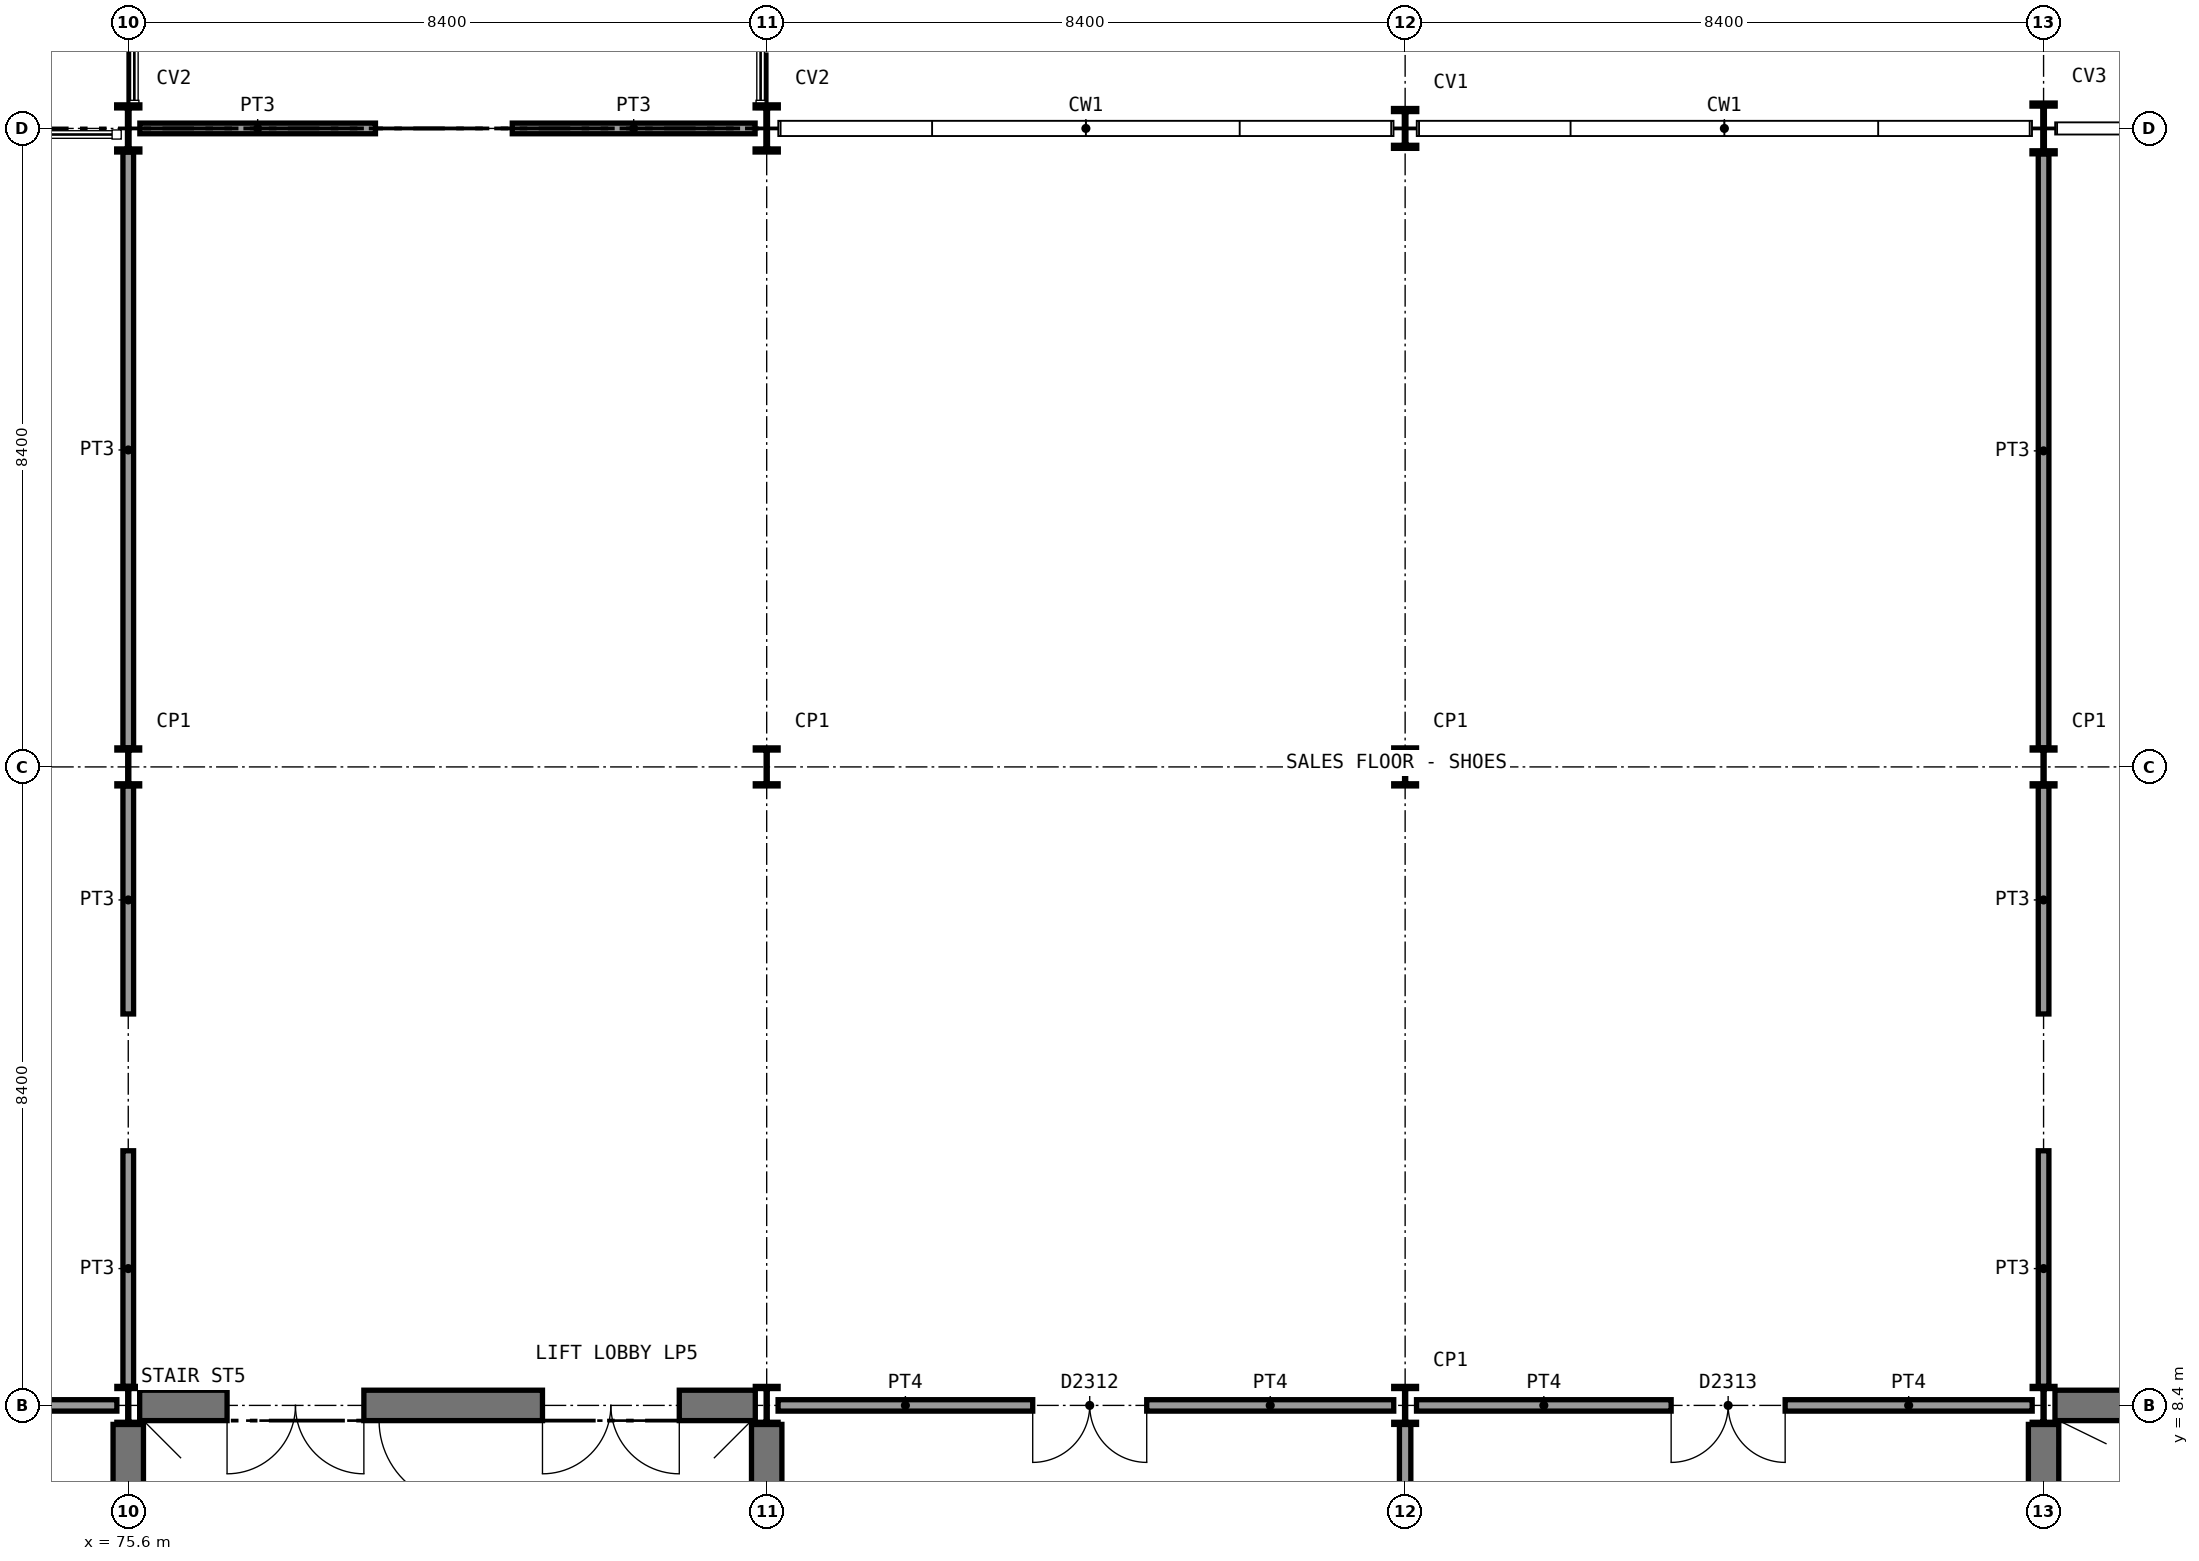
"""IFC4 building model, lengths in metres.
Left out: names, types, materials, properties, quantities, classifications, styles, units other than length and angle.
Written with IfcOpenShell. Run it as: python <this file> out.ifc"""

import sys

from ifc_helpers import new_model, si_unit, direction, frame, frame_2d, origin, origin_2d, place, context, subcontext, project, spatial, rectangle, i_section, extrude, element, fill, save


model = new_model("IFC4")
c1 = context("Model", 3, precision=1e-05, world=origin(), true_north=direction((0.0, 1.0)))
c2 = subcontext(c1, "Body", "Model", "MODEL_VIEW")
j1 = project(units=[si_unit("LENGTHUNIT", "METRE"), si_unit("PLANEANGLEUNIT", "RADIAN")], contexts=[c1])
p1 = place(None, origin())
s1 = spatial("IfcSite", under=j1, at=p1, CompositionType="ELEMENT")
p2 = place(p1, origin())
s2 = spatial("IfcBuilding", under=s1, at=p2, CompositionType="ELEMENT")
p3 = place(p2, frame((0.0, 0.0, 6.0)))
s3 = spatial("IfcBuildingStorey", under=s2, at=p3, CompositionType="ELEMENT", Elevation=6.0)
p4 = place(p3, frame((75.75, 8.4, 0.0), z_axis=(0.0, 0.0, 1.0), x_axis=(1.0, 0.0, 0.0)))
e1 = element("IfcWall", 1, at=p4, inside=s3, PredefinedType="SHEAR", context=c2, shape_type="SweptSolid", body=[
    extrude(rectangle(XDim=8.1, YDim=0.4, at=frame_2d((4.05, 0.0))), origin(), (0.0, 0.0, 1.0), 5.25),
])
p5 = place(p4, frame((1.15, 0.0, 0.0)))
e2 = element("IfcOpeningElement", 2, at=p5, cuts=e1, PredefinedType="OPENING", context=c2, shape_type="SweptSolid", body=[
    extrude(rectangle(XDim=1.8, YDim=2.1, at=frame_2d((0.9, 1.05))), frame((0.0, 0.21, 0.0), z_axis=(0.0, -1.0, 0.0), x_axis=(1.0, 0.0, 0.0)), (0.0, 0.0, 1.0), 0.42),
])
p6 = place(p4, frame((5.3, 0.0, 0.0)))
e3 = element("IfcOpeningElement", 3, at=p6, cuts=e1, PredefinedType="OPENING", context=c2, shape_type="SweptSolid", body=[
    extrude(rectangle(XDim=1.8, YDim=2.1, at=frame_2d((0.9, 1.05))), frame((0.0, 0.21, 0.0), z_axis=(0.0, -1.0, 0.0), x_axis=(1.0, 0.0, 0.0)), (0.0, 0.0, 1.0), 0.42),
])
for number, where, z_axis, x_axis in (
    (4, (75.6, 0.25, 0.0), (0.0, 0.0, 1.0), (0.0, 1.0, 0.0)),
    (5, (84.0, 0.25, 0.0), (0.0, 0.0, 1.0), (0.0, 1.0, 0.0)),
):
    element("IfcWall", number, at=place(p3, frame(where, z_axis=z_axis, x_axis=x_axis)), inside=s3, PredefinedType="SHEAR", context=c2, shape_type="SweptSolid", body=[
        extrude(rectangle(XDim=7.9, YDim=0.4, at=frame_2d((3.95, 0.0))), origin(), (0.0, 0.0, 1.0), 5.25),
    ])
p7 = place(p3, frame((100.95, 8.4, 0.0), z_axis=(0.0, 0.0, 1.0), x_axis=(1.0, 0.0, 0.0)))
e6 = element("IfcWall", 6, at=p7, inside=s3, PredefinedType="SHEAR", context=c2, shape_type="SweptSolid", body=[
    extrude(rectangle(XDim=16.4, YDim=0.4, at=frame_2d((8.2, 0.0))), origin(), (0.0, 0.0, 1.0), 5.25),
])
p8 = place(p7, frame((13.55, 0.0, 0.0)))
e7 = element("IfcOpeningElement", 7, at=p8, cuts=e6, PredefinedType="OPENING", context=c2, shape_type="SweptSolid", body=[
    extrude(rectangle(XDim=1.8, YDim=2.1, at=frame_2d((0.9, 1.05))), frame((0.0, 0.21, 0.0), z_axis=(0.0, -1.0, 0.0), x_axis=(1.0, 0.0, 0.0)), (0.0, 0.0, 1.0), 0.42),
])
p9 = place(p7, frame((4.65, 0.0, 0.0)))
e8 = element("IfcOpeningElement", 8, at=p9, cuts=e6, PredefinedType="OPENING", context=c2, shape_type="SweptSolid", body=[
    extrude(rectangle(XDim=2.4, YDim=2.4, at=frame_2d((1.2, 1.2))), frame((0.0, 0.21, 0.0), z_axis=(0.0, -1.0, 0.0), x_axis=(1.0, 0.0, 0.0)), (0.0, 0.0, 1.0), 0.42),
])
p10 = place(p3, frame((100.8, 0.25, 0.0), z_axis=(0.0, 0.0, 1.0), x_axis=(0.0, 1.0, 0.0)))
e9 = element("IfcWall", 9, at=p10, inside=s3, PredefinedType="SHEAR", context=c2, shape_type="SweptSolid", body=[
    extrude(rectangle(XDim=7.9, YDim=0.4, at=frame_2d((3.95, 0.0))), origin(), (0.0, 0.0, 1.0), 5.25),
])
for number, where, z_axis, x_axis in (
    (10, (75.6, 8.4, 0.0), (0.0, 0.0, 1.0), (1.0, 0.0, 0.0)),
    (11, (75.6, 16.8, 0.0), (0.0, 0.0, 1.0), (1.0, 0.0, 0.0)),
):
    element("IfcColumn", number, at=place(p3, frame(where, z_axis=z_axis, x_axis=x_axis)), inside=s3, PredefinedType="COLUMN", context=c2, shape_type="SweptSolid", body=[
        extrude(i_section(OverallWidth=0.3, OverallDepth=0.5, WebThickness=0.014, FlangeThickness=0.028, FilletRadius=0.027, at=origin_2d()), origin(), (0.0, 0.0, 1.0), 5.4),
    ])
p11 = place(p3, frame((75.6, 25.2, 0.0), z_axis=(0.0, 0.0, 1.0), x_axis=(1.0, 0.0, 0.0)))
e12 = element("IfcColumn", 12, at=p11, inside=s3, PredefinedType="COLUMN", context=c2, shape_type="SweptSolid", body=[
    extrude(i_section(OverallWidth=0.305, OverallDepth=0.62, WebThickness=0.021, FlangeThickness=0.04, FilletRadius=0.027, at=origin_2d()), origin(), (0.0, 0.0, 1.0), 5.4),
])
for number, where, z_axis, x_axis in (
    (13, (84.0, 8.4, 0.0), (0.0, 0.0, 1.0), (1.0, 0.0, 0.0)),
    (14, (84.0, 16.8, 0.0), (0.0, 0.0, 1.0), (1.0, 0.0, 0.0)),
):
    element("IfcColumn", number, at=place(p3, frame(where, z_axis=z_axis, x_axis=x_axis)), inside=s3, PredefinedType="COLUMN", context=c2, shape_type="SweptSolid", body=[
        extrude(i_section(OverallWidth=0.3, OverallDepth=0.5, WebThickness=0.014, FlangeThickness=0.028, FilletRadius=0.027, at=origin_2d()), origin(), (0.0, 0.0, 1.0), 5.4),
    ])
p12 = place(p3, frame((84.0, 25.2, 0.0), z_axis=(0.0, 0.0, 1.0), x_axis=(1.0, 0.0, 0.0)))
e15 = element("IfcColumn", 15, at=p12, inside=s3, PredefinedType="COLUMN", context=c2, shape_type="SweptSolid", body=[
    extrude(i_section(OverallWidth=0.305, OverallDepth=0.62, WebThickness=0.021, FlangeThickness=0.04, FilletRadius=0.027, at=origin_2d()), origin(), (0.0, 0.0, 1.0), 5.4),
])
for number, where, z_axis, x_axis in (
    (16, (92.4, 8.4, 0.0), (0.0, 0.0, 1.0), (1.0, 0.0, 0.0)),
    (17, (92.4, 16.8, 0.0), (0.0, 0.0, 1.0), (1.0, 0.0, 0.0)),
):
    element("IfcColumn", number, at=place(p3, frame(where, z_axis=z_axis, x_axis=x_axis)), inside=s3, PredefinedType="COLUMN", context=c2, shape_type="SweptSolid", body=[
        extrude(i_section(OverallWidth=0.3, OverallDepth=0.5, WebThickness=0.014, FlangeThickness=0.028, FilletRadius=0.027, at=origin_2d()), origin(), (0.0, 0.0, 1.0), 5.4),
    ])
p13 = place(p3, frame((92.4, 25.2, 0.0), z_axis=(0.0, 0.0, 1.0), x_axis=(1.0, 0.0, 0.0)))
e18 = element("IfcColumn", 18, at=p13, inside=s3, PredefinedType="COLUMN", context=c2, shape_type="SweptSolid", body=[
    extrude(i_section(OverallWidth=0.306, OverallDepth=0.524, WebThickness=0.021, FlangeThickness=0.04, FilletRadius=0.027, at=origin_2d()), origin(), (0.0, 0.0, 1.0), 5.4),
])
for number, where, z_axis, x_axis in (
    (19, (100.8, 8.4, 0.0), (0.0, 0.0, 1.0), (1.0, 0.0, 0.0)),
    (20, (100.8, 16.8, 0.0), (0.0, 0.0, 1.0), (1.0, 0.0, 0.0)),
):
    element("IfcColumn", number, at=place(p3, frame(where, z_axis=z_axis, x_axis=x_axis)), inside=s3, PredefinedType="COLUMN", context=c2, shape_type="SweptSolid", body=[
        extrude(i_section(OverallWidth=0.3, OverallDepth=0.5, WebThickness=0.014, FlangeThickness=0.028, FilletRadius=0.027, at=origin_2d()), origin(), (0.0, 0.0, 1.0), 5.4),
    ])
p14 = place(p3, frame((100.8, 25.2, 0.0), z_axis=(0.0, 0.0, 1.0), x_axis=(1.0, 0.0, 0.0)))
e21 = element("IfcColumn", 21, at=p14, inside=s3, PredefinedType="COLUMN", context=c2, shape_type="SweptSolid", body=[
    extrude(i_section(OverallWidth=0.305, OverallDepth=0.668, WebThickness=0.021, FlangeThickness=0.04, FilletRadius=0.027, at=origin_2d()), origin(), (0.0, 0.0, 1.0), 5.4),
])
p15 = place(p3, frame((67.35, 8.4, 0.0), z_axis=(0.0, 0.0, 1.0), x_axis=(1.0, 0.0, 0.0)))
e22 = element("IfcWall", 22, at=p15, inside=s3, PredefinedType="SOLIDWALL", context=c2, shape_type="SweptSolid", body=[
    extrude(rectangle(XDim=8.1, YDim=0.15, at=frame_2d((4.05, 0.0))), origin(), (0.0, 0.0, 1.0), 4.92),
])
p16 = place(p15, frame((3.35, 0.0, 0.0)))
e23 = element("IfcOpeningElement", 23, at=p16, cuts=e22, PredefinedType="OPENING", context=c2, shape_type="SweptSolid", body=[
    extrude(rectangle(XDim=1.5, YDim=2.1, at=frame_2d((0.75, 1.05))), frame((0.0, 0.085, 0.0), z_axis=(0.0, -1.0, 0.0), x_axis=(1.0, 0.0, 0.0)), (0.0, 0.0, 1.0), 0.17),
])
p17 = place(p3, frame((92.4, 0.25, 0.0), z_axis=(0.0, 0.0, 1.0), x_axis=(0.0, 1.0, 0.0)))
e24 = element("IfcWall", 24, at=p17, inside=s3, PredefinedType="SOLIDWALL", context=c2, shape_type="SweptSolid", body=[
    extrude(rectangle(XDim=7.9, YDim=0.15, at=frame_2d((3.95, 0.0))), origin(), (0.0, 0.0, 1.0), 4.81),
])
p18 = place(p3, frame((84.15, 8.4, 0.0), z_axis=(0.0, 0.0, 1.0), x_axis=(1.0, 0.0, 0.0)))
e25 = element("IfcWall", 25, at=p18, inside=s3, PredefinedType="SOLIDWALL", context=c2, shape_type="SweptSolid", body=[
    extrude(rectangle(XDim=8.1, YDim=0.15, at=frame_2d((4.05, 0.0))), origin(), (0.0, 0.0, 1.0), 4.92),
])
p19 = place(p18, frame((3.35, 0.0, 0.0)))
e26 = element("IfcOpeningElement", 26, at=p19, cuts=e25, PredefinedType="OPENING", context=c2, shape_type="SweptSolid", body=[
    extrude(rectangle(XDim=1.5, YDim=2.1, at=frame_2d((0.75, 1.05))), frame((0.0, 0.085, 0.0), z_axis=(0.0, -1.0, 0.0), x_axis=(1.0, 0.0, 0.0)), (0.0, 0.0, 1.0), 0.17),
])
p20 = place(p3, frame((92.55, 8.4, 0.0), z_axis=(0.0, 0.0, 1.0), x_axis=(1.0, 0.0, 0.0)))
e27 = element("IfcWall", 27, at=p20, inside=s3, PredefinedType="SOLIDWALL", context=c2, shape_type="SweptSolid", body=[
    extrude(rectangle(XDim=8.1, YDim=0.15, at=frame_2d((4.05, 0.0))), origin(), (0.0, 0.0, 1.0), 4.92),
])
p21 = place(p20, frame((3.35, 0.0, 0.0)))
e28 = element("IfcOpeningElement", 28, at=p21, cuts=e27, PredefinedType="OPENING", context=c2, shape_type="SweptSolid", body=[
    extrude(rectangle(XDim=1.5, YDim=2.1, at=frame_2d((0.75, 1.05))), frame((0.0, 0.085, 0.0), z_axis=(0.0, -1.0, 0.0), x_axis=(1.0, 0.0, 0.0)), (0.0, 0.0, 1.0), 0.17),
])
p22 = place(p3, frame((75.6, 8.65, 0.0), z_axis=(0.0, 0.0, 1.0), x_axis=(0.0, 1.0, 0.0)))
e29 = element("IfcWall", 29, at=p22, inside=s3, PredefinedType="PARTITIONING", context=c2, shape_type="SweptSolid", body=[
    extrude(rectangle(XDim=3.1, YDim=0.14, at=frame_2d((1.55, 0.0))), origin(), (0.0, 0.0, 1.0), 4.81),
])
p23 = place(p3, frame((75.6, 13.55, 0.0), z_axis=(0.0, 0.0, 1.0), x_axis=(0.0, 1.0, 0.0)))
e30 = element("IfcWall", 30, at=p23, inside=s3, PredefinedType="PARTITIONING", context=c2, shape_type="SweptSolid", body=[
    extrude(rectangle(XDim=3.0, YDim=0.14, at=frame_2d((1.5, 0.0))), origin(), (0.0, 0.0, 1.0), 4.81),
])
p24 = place(p3, frame((75.6, 17.05, 0.0), z_axis=(0.0, 0.0, 1.0), x_axis=(0.0, 1.0, 0.0)))
e31 = element("IfcWall", 31, at=p24, inside=s3, PredefinedType="PARTITIONING", context=c2, shape_type="SweptSolid", body=[
    extrude(rectangle(XDim=7.84, YDim=0.14, at=frame_2d((3.92, 0.0))), origin(), (0.0, 0.0, 1.0), 4.81),
])
p25 = place(p3, frame((100.8, 8.65, 0.0), z_axis=(0.0, 0.0, 1.0), x_axis=(0.0, 1.0, 0.0)))
e32 = element("IfcWall", 32, at=p25, inside=s3, PredefinedType="PARTITIONING", context=c2, shape_type="SweptSolid", body=[
    extrude(rectangle(XDim=3.1, YDim=0.14, at=frame_2d((1.55, 0.0))), origin(), (0.0, 0.0, 1.0), 4.81),
])
p26 = place(p3, frame((100.8, 13.55, 0.0), z_axis=(0.0, 0.0, 1.0), x_axis=(0.0, 1.0, 0.0)))
e33 = element("IfcWall", 33, at=p26, inside=s3, PredefinedType="PARTITIONING", context=c2, shape_type="SweptSolid", body=[
    extrude(rectangle(XDim=3.0, YDim=0.14, at=frame_2d((1.5, 0.0))), origin(), (0.0, 0.0, 1.0), 4.81),
])
p27 = place(p3, frame((100.8, 17.05, 0.0), z_axis=(0.0, 0.0, 1.0), x_axis=(0.0, 1.0, 0.0)))
e34 = element("IfcWall", 34, at=p27, inside=s3, PredefinedType="PARTITIONING", context=c2, shape_type="SweptSolid", body=[
    extrude(rectangle(XDim=7.816, YDim=0.14, at=frame_2d((3.908, 0.0))), origin(), (0.0, 0.0, 1.0), 4.81),
])
p28 = place(p3, frame((75.753, 25.2, 0.0), z_axis=(0.0, 0.0, 1.0), x_axis=(1.0, 0.0, 0.0)))
e35 = element("IfcWall", 35, at=p28, inside=s3, PredefinedType="PARTITIONING", context=c2, shape_type="SweptSolid", body=[
    extrude(rectangle(XDim=3.1, YDim=0.14, at=frame_2d((1.55, 0.0))), origin(), (0.0, 0.0, 1.0), 4.81),
])
p29 = place(p3, frame((80.653, 25.2, 0.0), z_axis=(0.0, 0.0, 1.0), x_axis=(1.0, 0.0, 0.0)))
e36 = element("IfcWall", 36, at=p29, inside=s3, PredefinedType="PARTITIONING", context=c2, shape_type="SweptSolid", body=[
    extrude(rectangle(XDim=3.195, YDim=0.14, at=frame_2d((1.597, 0.0))), origin(), (0.0, 0.0, 1.0), 4.81),
])
p30 = place(p3, frame((80.0, 0.2, 0.0), z_axis=(0.0, 0.0, 1.0), x_axis=(0.0, 1.0, 0.0)))
e37 = element("IfcWall", 37, at=p30, inside=s3, PredefinedType="SHEAR", context=c2, shape_type="SweptSolid", body=[
    extrude(rectangle(XDim=8.0, YDim=0.2, at=frame_2d((4.0, 0.0))), origin(), (0.0, 0.0, 1.0), 5.25),
])
p31 = place(p30, frame((6.9, 0.0, 0.0)))
e38 = element("IfcOpeningElement", 38, at=p31, cuts=e37, PredefinedType="OPENING", context=c2, shape_type="SweptSolid", body=[
    extrude(rectangle(XDim=1.11, YDim=2.1, at=frame_2d((0.555, 1.05))), frame((0.0, 0.11, 0.0), z_axis=(0.0, -1.0, 0.0), x_axis=(1.0, 0.0, 0.0)), (0.0, 0.0, 1.0), 0.22),
])
p32 = place(p19, frame((1.5, 0.0, 0.0), z_axis=(0.0, 0.0, 1.0), x_axis=(-1.0, 0.0, 0.0)))
e39 = element("IfcDoor", 39, at=p32, inside=s3, OperationType="DOUBLE_DOOR_SINGLE_SWING", PredefinedType="DOOR", context=c2, shape_type="SweptSolid", body=[
    extrude(rectangle(XDim=1.5, YDim=2.1, at=frame_2d((0.75, 1.05))), frame((0.0, 0.025, 0.0), z_axis=(0.0, -1.0, 0.0), x_axis=(1.0, 0.0, 0.0)), (0.0, 0.0, 1.0), 0.05),
])
fill(e26, e39)
p33 = place(p21, frame((1.5, 0.0, 0.0), z_axis=(0.0, 0.0, 1.0), x_axis=(-1.0, 0.0, 0.0)))
e40 = element("IfcDoor", 40, at=p33, inside=s3, OperationType="DOUBLE_DOOR_SINGLE_SWING", PredefinedType="DOOR", context=c2, shape_type="SweptSolid", body=[
    extrude(rectangle(XDim=1.5, YDim=2.1, at=frame_2d((0.75, 1.05))), frame((0.0, 0.025, 0.0), z_axis=(0.0, -1.0, 0.0), x_axis=(1.0, 0.0, 0.0)), (0.0, 0.0, 1.0), 0.05),
])
fill(e28, e40)
p34 = place(p31, origin())
e41 = element("IfcDoor", 41, at=p34, inside=s3, OperationType="SINGLE_SWING_RIGHT", PredefinedType="DOOR", context=c2, shape_type="SweptSolid", body=[
    extrude(rectangle(XDim=1.1, YDim=2.1, at=frame_2d((0.55, 1.05))), frame((0.0, 0.025, 0.0), z_axis=(0.0, -1.0, 0.0), x_axis=(1.0, 0.0, 0.0)), (0.0, 0.0, 1.0), 0.05),
])
fill(e38, e41)
p35 = place(p5, frame((1.8, 0.0, 0.0), z_axis=(0.0, 0.0, 1.0), x_axis=(-1.0, 0.0, 0.0)))
e42 = element("IfcDoor", 42, at=p35, inside=s3, OperationType="DOUBLE_DOOR_SINGLE_SWING", PredefinedType="DOOR", context=c2, shape_type="SweptSolid", body=[
    extrude(rectangle(XDim=1.8, YDim=2.1, at=frame_2d((0.9, 1.05))), frame((0.0, 0.025, 0.0), z_axis=(0.0, -1.0, 0.0), x_axis=(1.0, 0.0, 0.0)), (0.0, 0.0, 1.0), 0.05),
])
fill(e2, e42)
p36 = place(p6, frame((1.8, 0.0, 0.0), z_axis=(0.0, 0.0, 1.0), x_axis=(-1.0, 0.0, 0.0)))
e43 = element("IfcDoor", 43, at=p36, inside=s3, OperationType="DOUBLE_DOOR_SINGLE_SWING", PredefinedType="DOOR", context=c2, shape_type="SweptSolid", body=[
    extrude(rectangle(XDim=1.8, YDim=2.1, at=frame_2d((0.9, 1.05))), frame((0.0, 0.025, 0.0), z_axis=(0.0, -1.0, 0.0), x_axis=(1.0, 0.0, 0.0)), (0.0, 0.0, 1.0), 0.05),
])
fill(e3, e43)
save(model, sys.argv[1])
